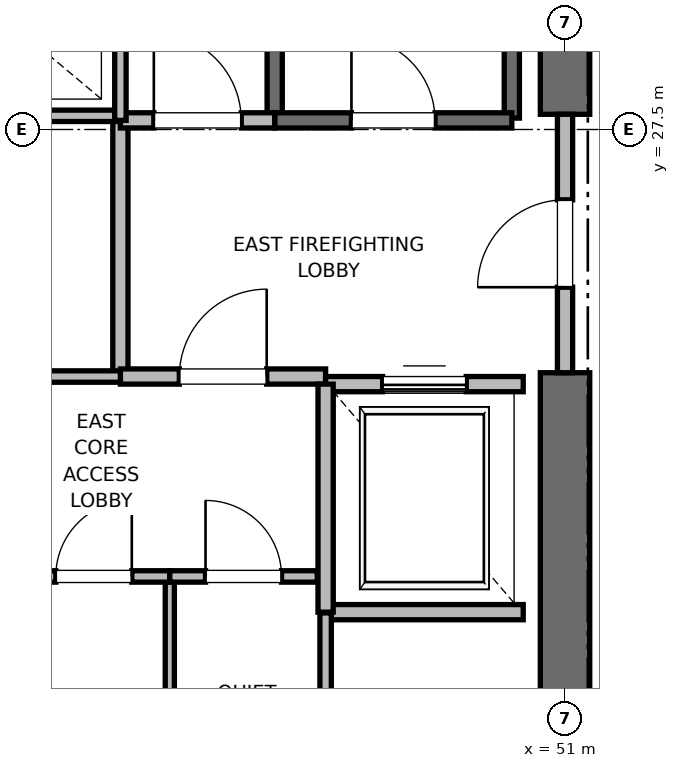
"""IFC4 building model, lengths in metres.
Left out: names, types, materials, properties, quantities, classifications, styles, units other than length and angle.
Written with IfcOpenShell. Run it as: python <this file> out.ifc"""

import sys

from ifc_helpers import new_model, si_unit, direction, frame, frame_2d, origin, place, context, subcontext, project, spatial, rectangle, extrude, element, fill, save


model = new_model("IFC4")
c1 = context("Model", 3, precision=1e-05, world=origin(), true_north=direction((0.0, 1.0)))
c2 = subcontext(c1, "Body", "Model", "MODEL_VIEW")
j1 = project(units=[si_unit("LENGTHUNIT", "METRE"), si_unit("PLANEANGLEUNIT", "RADIAN")], contexts=[c1])
p1 = place(None, origin())
s1 = spatial("IfcSite", under=j1, at=p1, CompositionType="ELEMENT")
p2 = place(p1, origin())
s2 = spatial("IfcBuilding", under=s1, at=p2, CompositionType="ELEMENT")
p3 = place(p2, frame((0.0, 0.0, 27.6)))
s3 = spatial("IfcBuildingStorey", under=s2, at=p3, CompositionType="ELEMENT", Elevation=27.6)
p4 = place(p3, frame((51.0, 18.5, 0.0), z_axis=(0.0, 0.0, 1.0), x_axis=(0.0, 1.0, 0.0)))
e1 = element("IfcWall", 1, at=p4, inside=s3, PredefinedType="SHEAR", context=c2, shape_type="SweptSolid", body=[
    extrude(rectangle(XDim=5.8, YDim=0.65, at=frame_2d((2.9, 0.0))), origin(), (0.0, 0.0, 1.0), 3.76),
])
p5 = place(p3, frame((51.0, 27.7, 0.0), z_axis=(0.0, 0.0, 1.0), x_axis=(0.0, 1.0, 0.0)))
e2 = element("IfcWall", 2, at=p5, inside=s3, PredefinedType="SHEAR", context=c2, shape_type="SweptSolid", body=[
    extrude(rectangle(XDim=8.8, YDim=0.65, at=frame_2d((4.4, 0.0))), origin(), (0.0, 0.0, 1.0), 3.76),
])
p6 = place(p3, frame((50.3, 27.65, 0.0), z_axis=(0.0, 0.0, 1.0), x_axis=(0.0, 1.0, 0.0)))
e3 = element("IfcWall", 3, at=p6, inside=s3, PredefinedType="SOLIDWALL", context=c2, shape_type="SweptSolid", body=[
    extrude(rectangle(XDim=8.15, YDim=0.2, at=frame_2d((4.075, 0.0))), origin(), (0.0, 0.0, 1.0), 3.76),
])
p7 = place(p3, frame((47.18, 27.62, 0.0), z_axis=(0.0, 0.0, 1.0), x_axis=(0.0, 1.0, 0.0)))
e4 = element("IfcWall", 4, at=p7, inside=s3, PredefinedType="SOLIDWALL", context=c2, shape_type="SweptSolid", body=[
    extrude(rectangle(XDim=8.18, YDim=0.2, at=frame_2d((4.09, 0.0))), origin(), (0.0, 0.0, 1.0), 3.76),
])
p8 = place(p3, frame((47.18, 27.62, 0.0), z_axis=(0.0, 0.0, 1.0), x_axis=(1.0, 0.0, 0.0)))
e5 = element("IfcWall", 5, at=p8, inside=s3, PredefinedType="SOLIDWALL", context=c2, shape_type="SweptSolid", body=[
    extrude(rectangle(XDim=3.12, YDim=0.2, at=frame_2d((1.56, 0.0))), origin(), (0.0, 0.0, 1.0), 3.76),
])
p9 = place(p8, frame((1.01, 0.0, 0.0)))
e6 = element("IfcOpeningElement", 6, at=p9, cuts=e5, PredefinedType="OPENING", context=c2, shape_type="SweptSolid", body=[
    extrude(rectangle(XDim=1.1, YDim=2.15, at=frame_2d((0.55, 1.075))), frame((0.0, 0.1, 0.0), z_axis=(0.0, -1.0, 0.0), x_axis=(1.0, 0.0, 0.0)), (0.0, 0.0, 1.0), 0.2),
])
p10 = place(p3, frame((45.15, 24.25, 0.0), z_axis=(0.0, 0.0, 1.0), x_axis=(0.0, 1.0, 0.0)))
e7 = element("IfcWall", 7, at=p10, inside=s3, PredefinedType="PARTITIONING", context=c2, shape_type="SweptSolid", body=[
    extrude(rectangle(XDim=3.37, YDim=0.2, at=frame_2d((1.685, 0.0))), origin(), (0.0, 0.0, 1.0), 3.76),
])
p11 = place(p3, frame((45.15, 24.25, 0.0), z_axis=(0.0, 0.0, 1.0), x_axis=(1.0, 0.0, 0.0)))
e8 = element("IfcWall", 8, at=p11, inside=s3, PredefinedType="PARTITIONING", context=c2, shape_type="SweptSolid", body=[
    extrude(rectangle(XDim=2.7, YDim=0.2, at=frame_2d((1.35, 0.0))), origin(), (0.0, 0.0, 1.0), 3.76),
])
p12 = place(p11, frame((0.775, 0.0, 0.0)))
e9 = element("IfcOpeningElement", 9, at=p12, cuts=e8, PredefinedType="OPENING", context=c2, shape_type="SweptSolid", body=[
    extrude(rectangle(XDim=1.15, YDim=2.2, at=frame_2d((0.575, 1.1))), frame((0.0, 0.1, 0.0), z_axis=(0.0, -1.0, 0.0), x_axis=(1.0, 0.0, 0.0)), (0.0, 0.0, 1.0), 0.2),
])
p13 = place(p3, frame((45.15, 27.62, 0.0), z_axis=(0.0, 0.0, 1.0), x_axis=(1.0, 0.0, 0.0)))
e10 = element("IfcWall", 10, at=p13, inside=s3, PredefinedType="PARTITIONING", context=c2, shape_type="SweptSolid", body=[
    extrude(rectangle(XDim=2.03, YDim=0.2, at=frame_2d((1.015, 0.0))), origin(), (0.0, 0.0, 1.0), 3.76),
])
p14 = place(p13, frame((0.44, 0.0, 0.0)))
e11 = element("IfcOpeningElement", 11, at=p14, cuts=e10, PredefinedType="OPENING", context=c2, shape_type="SweptSolid", body=[
    extrude(rectangle(XDim=1.15, YDim=2.2, at=frame_2d((0.575, 1.1))), frame((0.0, 0.1, 0.0), z_axis=(0.0, -1.0, 0.0), x_axis=(1.0, 0.0, 0.0)), (0.0, 0.0, 1.0), 0.2),
])
p15 = place(p3, frame((51.0, 24.3, 0.0), z_axis=(0.0, 0.0, 1.0), x_axis=(0.0, 1.0, 0.0)))
e12 = element("IfcWall", 12, at=p15, inside=s3, PredefinedType="PARTITIONING", context=c2, shape_type="SweptSolid", body=[
    extrude(rectangle(XDim=3.4, YDim=0.2, at=frame_2d((1.7, 0.0))), origin(), (0.0, 0.0, 1.0), 2.54),
])
p16 = place(p15, frame((1.125, 0.0, 0.0)))
e13 = element("IfcOpeningElement", 13, at=p16, cuts=e12, PredefinedType="OPENING", context=c2, shape_type="SweptSolid", body=[
    extrude(rectangle(XDim=1.15, YDim=2.2, at=frame_2d((0.575, 1.1))), frame((0.0, 0.1, 0.0), z_axis=(0.0, -1.0, 0.0), x_axis=(1.0, 0.0, 0.0)), (0.0, 0.0, 1.0), 0.2),
])
p17 = place(p3, frame((47.85, 21.15, 0.0), z_axis=(0.0, 0.0, 1.0), x_axis=(1.0, 0.0, 0.0)))
e14 = element("IfcWall", 14, at=p17, inside=s3, PredefinedType="SOLIDWALL", context=c2, shape_type="SweptSolid", body=[
    extrude(rectangle(XDim=2.6, YDim=0.2, at=frame_2d((1.3, 0.0))), origin(), (0.0, 0.0, 1.0), 3.76),
])
p18 = place(p3, frame((50.45, 24.15, 0.0), z_axis=(0.0, 0.0, 1.0), x_axis=(-1.0, 0.0, 0.0)))
e15 = element("IfcWall", 15, at=p18, inside=s3, PredefinedType="SOLIDWALL", context=c2, shape_type="SweptSolid", body=[
    extrude(rectangle(XDim=2.6, YDim=0.2, at=frame_2d((1.3, 0.0))), origin(), (0.0, 0.0, 1.0), 2.54),
])
p19 = place(p18, frame((0.75, 0.0, 0.0)))
e16 = element("IfcOpeningElement", 16, at=p19, cuts=e15, PredefinedType="OPENING", context=c2, shape_type="SweptSolid", body=[
    extrude(rectangle(XDim=1.1, YDim=2.2, at=frame_2d((0.55, 1.1))), frame((0.0, 0.1, 0.0), z_axis=(0.0, -1.0, 0.0), x_axis=(1.0, 0.0, 0.0)), (0.0, 0.0, 1.0), 0.2),
])
p20 = place(p3, frame((47.85, 24.15, 0.0), z_axis=(0.0, 0.0, 1.0), x_axis=(0.0, -1.0, 0.0)))
e17 = element("IfcWall", 17, at=p20, inside=s3, PredefinedType="SOLIDWALL", context=c2, shape_type="SweptSolid", body=[
    extrude(rectangle(XDim=3.0, YDim=0.2, at=frame_2d((1.5, 0.0))), origin(), (0.0, 0.0, 1.0), 3.76),
])
p21 = place(p3, frame((41.56, 27.68, 0.0), z_axis=(0.0, 0.0, 1.0), x_axis=(1.0, 0.0, 0.0)))
e18 = element("IfcWall", 18, at=p21, inside=s3, PredefinedType="PARTITIONING", context=c2, shape_type="SweptSolid", body=[
    extrude(rectangle(XDim=3.59, YDim=0.15, at=frame_2d((1.795, 0.0))), origin(), (0.0, 0.0, 1.0), 2.85),
])
p22 = place(p3, frame((47.85, 18.6, 0.0), z_axis=(0.0, 0.0, 1.0), x_axis=(0.0, 1.0, 0.0)))
e19 = element("IfcWall", 19, at=p22, inside=s3, PredefinedType="PARTITIONING", context=c2, shape_type="SweptSolid", body=[
    extrude(rectangle(XDim=2.54, YDim=0.15, at=frame_2d((1.27, 0.0))), origin(), (0.0, 0.0, 1.0), 2.85),
])
p23 = place(p3, frame((45.8, 18.6, 0.0), z_axis=(0.0, 0.0, 1.0), x_axis=(0.0, 1.0, 0.0)))
e20 = element("IfcWall", 20, at=p23, inside=s3, PredefinedType="PARTITIONING", context=c2, shape_type="SweptSolid", body=[
    extrude(rectangle(XDim=3.02, YDim=0.12, at=frame_2d((1.51, 0.0))), origin(), (0.0, 0.0, 1.0), 2.85),
])
p24 = place(p3, frame((43.8, 21.62, 0.0), z_axis=(0.0, 0.0, 1.0), x_axis=(1.0, 0.0, 0.0)))
e21 = element("IfcWall", 21, at=p24, inside=s3, PredefinedType="PARTITIONING", context=c2, shape_type="SweptSolid", body=[
    extrude(rectangle(XDim=2.0, YDim=0.15, at=frame_2d((1.0, 0.0))), origin(), (0.0, 0.0, 1.0), 2.85),
])
p25 = place(p24, frame((0.5, 0.0, 0.0)))
e22 = element("IfcOpeningElement", 22, at=p25, cuts=e21, PredefinedType="OPENING", context=c2, shape_type="SweptSolid", body=[
    extrude(rectangle(XDim=1.0, YDim=2.15, at=frame_2d((0.5, 1.075))), frame((0.0, 0.075, 0.0), z_axis=(0.0, -1.0, 0.0), x_axis=(1.0, 0.0, 0.0)), (0.0, 0.0, 1.0), 0.15),
])
p26 = place(p3, frame((45.8, 21.62, 0.0), z_axis=(0.0, 0.0, 1.0), x_axis=(1.0, 0.0, 0.0)))
e23 = element("IfcWall", 23, at=p26, inside=s3, PredefinedType="PARTITIONING", context=c2, shape_type="SweptSolid", body=[
    extrude(rectangle(XDim=1.94, YDim=0.15, at=frame_2d((0.97, 0.0))), origin(), (0.0, 0.0, 1.0), 2.85),
])
p27 = place(p26, frame((0.47, 0.0, 0.0)))
e24 = element("IfcOpeningElement", 24, at=p27, cuts=e23, PredefinedType="OPENING", context=c2, shape_type="SweptSolid", body=[
    extrude(rectangle(XDim=1.0, YDim=2.15, at=frame_2d((0.5, 1.075))), frame((0.0, 0.075, 0.0), z_axis=(0.0, -1.0, 0.0), x_axis=(1.0, 0.0, 0.0)), (0.0, 0.0, 1.0), 0.15),
])
p28 = place(p3, frame((41.76, 24.25, 0.0), z_axis=(0.0, 0.0, 1.0), x_axis=(1.0, 0.0, 0.0)))
e25 = element("IfcWall", 25, at=p28, inside=s3, PredefinedType="PARTITIONING", context=c2, shape_type="SweptSolid", body=[
    extrude(rectangle(XDim=3.39, YDim=0.15, at=frame_2d((1.695, 0.0))), origin(), (0.0, 0.0, 1.0), 2.85),
])
p29 = place(p28, frame((1.255, 0.0, 0.0)))
e26 = element("IfcOpeningElement", 26, at=p29, cuts=e25, PredefinedType="OPENING", context=c2, shape_type="SweptSolid", body=[
    extrude(rectangle(XDim=0.88, YDim=2.1, at=frame_2d((0.44, 1.05))), frame((0.0, 0.075, 0.0), z_axis=(0.0, -1.0, 0.0), x_axis=(1.0, 0.0, 0.0)), (0.0, 0.0, 1.0), 0.15),
])
p30 = place(p3, frame((45.15, 27.62, 0.0), z_axis=(0.0, 0.0, 1.0), x_axis=(0.0, 1.0, 0.0)))
e27 = element("IfcWall", 27, at=p30, inside=s3, PredefinedType="PARTITIONING", context=c2, shape_type="SweptSolid", body=[
    extrude(rectangle(XDim=3.1, YDim=0.15, at=frame_2d((1.55, 0.0))), origin(), (0.0, 0.0, 1.0), 2.85),
])
p31 = place(p9, origin())
e28 = element("IfcDoor", 28, at=p31, inside=s3, OperationType="SINGLE_SWING_LEFT", PredefinedType="DOOR", context=c2, shape_type="SweptSolid", body=[
    extrude(rectangle(XDim=1.1, YDim=2.15, at=frame_2d((0.55, 1.075))), frame((0.0, 0.025, 0.0), z_axis=(0.0, -1.0, 0.0), x_axis=(1.0, 0.0, 0.0)), (0.0, 0.0, 1.0), 0.05),
])
fill(e6, e28)
p32 = place(p12, origin())
e29 = element("IfcDoor", 29, at=p32, inside=s3, OperationType="SINGLE_SWING_RIGHT", PredefinedType="DOOR", context=c2, shape_type="SweptSolid", body=[
    extrude(rectangle(XDim=1.15, YDim=2.2, at=frame_2d((0.575, 1.1))), frame((0.0, 0.025, 0.0), z_axis=(0.0, -1.0, 0.0), x_axis=(1.0, 0.0, 0.0)), (0.0, 0.0, 1.0), 0.05),
])
fill(e9, e29)
p33 = place(p14, origin())
e30 = element("IfcDoor", 30, at=p33, inside=s3, OperationType="SINGLE_SWING_LEFT", PredefinedType="DOOR", context=c2, shape_type="SweptSolid", body=[
    extrude(rectangle(XDim=1.15, YDim=2.2, at=frame_2d((0.575, 1.1))), frame((0.0, 0.025, 0.0), z_axis=(0.0, -1.0, 0.0), x_axis=(1.0, 0.0, 0.0)), (0.0, 0.0, 1.0), 0.05),
])
fill(e11, e30)
p34 = place(p16, origin())
e31 = element("IfcDoor", 31, at=p34, inside=s3, OperationType="SINGLE_SWING_LEFT", PredefinedType="DOOR", context=c2, shape_type="SweptSolid", body=[
    extrude(rectangle(XDim=1.15, YDim=2.2, at=frame_2d((0.575, 1.1))), frame((0.0, 0.025, 0.0), z_axis=(0.0, -1.0, 0.0), x_axis=(1.0, 0.0, 0.0)), (0.0, 0.0, 1.0), 0.05),
])
fill(e13, e31)
p35 = place(p19, origin())
e32 = element("IfcDoor", 32, at=p35, inside=s3, OperationType="SLIDING_TO_RIGHT", PredefinedType="DOOR", context=c2, shape_type="SweptSolid", body=[
    extrude(rectangle(XDim=1.1, YDim=2.2, at=frame_2d((0.55, 1.1))), frame((0.0, 0.025, 0.0), z_axis=(0.0, -1.0, 0.0), x_axis=(1.0, 0.0, 0.0)), (0.0, 0.0, 1.0), 0.05),
])
fill(e16, e32)
p36 = place(p25, origin())
e33 = element("IfcDoor", 33, at=p36, inside=s3, OperationType="SINGLE_SWING_RIGHT", PredefinedType="DOOR", context=c2, shape_type="SweptSolid", body=[
    extrude(rectangle(XDim=1.0, YDim=2.15, at=frame_2d((0.5, 1.075))), frame((0.0, 0.025, 0.0), z_axis=(0.0, -1.0, 0.0), x_axis=(1.0, 0.0, 0.0)), (0.0, 0.0, 1.0), 0.05),
])
fill(e22, e33)
p37 = place(p27, origin())
e34 = element("IfcDoor", 34, at=p37, inside=s3, OperationType="SINGLE_SWING_LEFT", PredefinedType="DOOR", context=c2, shape_type="SweptSolid", body=[
    extrude(rectangle(XDim=1.0, YDim=2.15, at=frame_2d((0.5, 1.075))), frame((0.0, 0.025, 0.0), z_axis=(0.0, -1.0, 0.0), x_axis=(1.0, 0.0, 0.0)), (0.0, 0.0, 1.0), 0.05),
])
fill(e24, e34)
save(model, sys.argv[1])
